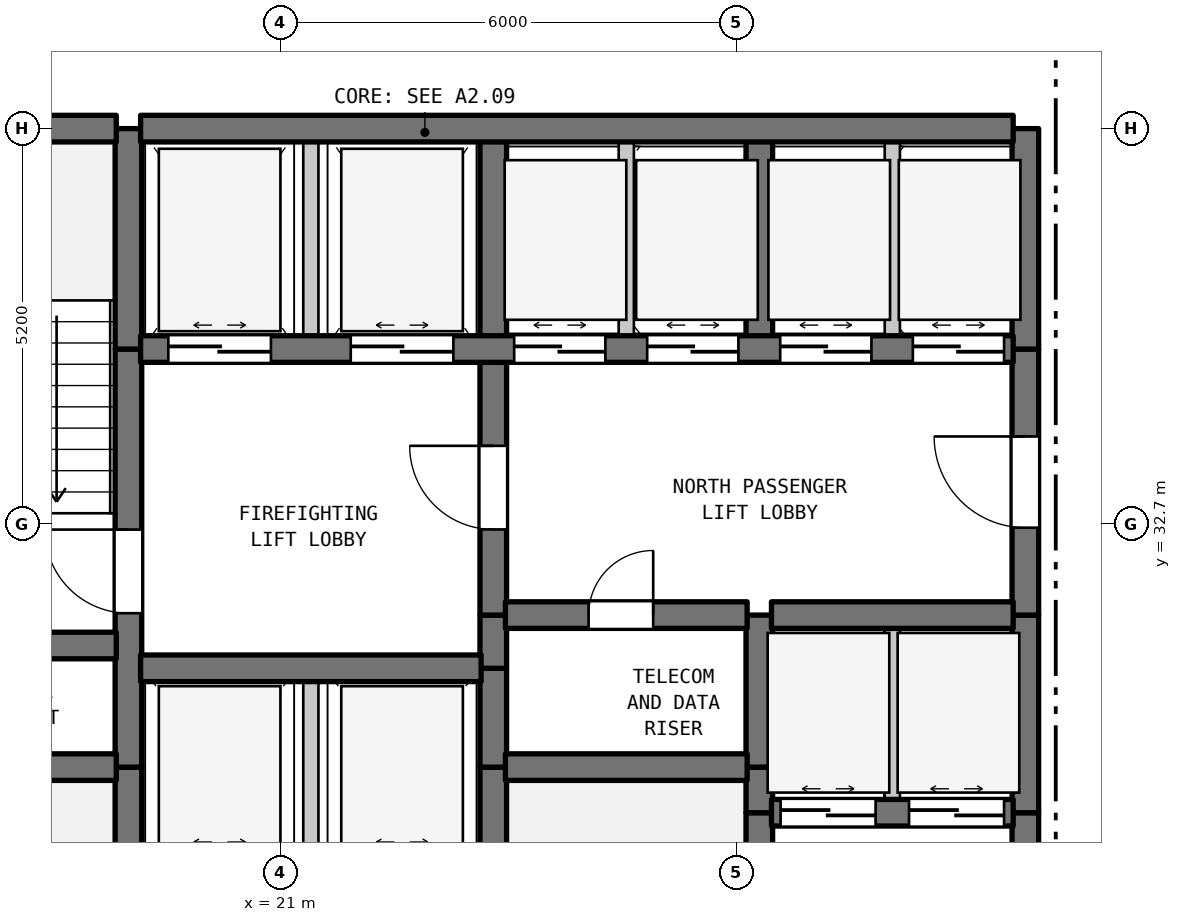
"""IFC4 building model, lengths in metres.
Left out: names, types, materials, properties, quantities, classifications, styles, units other than length and angle.
Written with IfcOpenShell. Run it as: python <this file> out.ifc"""

import sys

from ifc_helpers import new_model, si_unit, direction, frame, frame_2d, origin, place, context, subcontext, project, spatial, rectangle, extrude, element, fill, save


model = new_model("IFC4")
c1 = context("Model", 3, precision=1e-05, world=origin(), true_north=direction((0.0, 1.0)))
c2 = subcontext(c1, "Body", "Model", "MODEL_VIEW")
j1 = project(units=[si_unit("LENGTHUNIT", "METRE"), si_unit("PLANEANGLEUNIT", "RADIAN")], contexts=[c1])
p1 = place(None, origin())
s1 = spatial("IfcSite", under=j1, at=p1, CompositionType="ELEMENT")
p2 = place(p1, origin())
s2 = spatial("IfcBuilding", under=s1, at=p2, CompositionType="ELEMENT")
p3 = place(p2, frame((0.0, 0.0, 105.7)))
s3 = spatial("IfcBuildingStorey", under=s2, at=p3, CompositionType="ELEMENT", Elevation=105.7)
p4 = place(p3, frame((19.0, 28.2, 0.0), z_axis=(0.0, 0.0, 1.0), x_axis=(0.0, 1.0, 0.0)))
e1 = element("IfcWall", 1, at=p4, inside=s3, PredefinedType="SHEAR", context=c2, shape_type="SweptSolid", body=[
    extrude(rectangle(XDim=1.3, YDim=0.35, at=frame_2d((0.65, 0.0))), origin(), (0.0, 0.0, 1.0), 3.385),
])
p5 = place(p3, frame((19.0, 29.5, 0.0), z_axis=(0.0, 0.0, 1.0), x_axis=(0.0, 1.0, 0.0)))
e2 = element("IfcWall", 2, at=p5, inside=s3, PredefinedType="SHEAR", context=c2, shape_type="SweptSolid", body=[
    extrude(rectangle(XDim=5.5, YDim=0.35, at=frame_2d((2.75, 0.0))), origin(), (0.0, 0.0, 1.0), 3.385),
])
p6 = place(p5, frame((2.025, 0.0, 0.0)))
e3 = element("IfcOpeningElement", 3, at=p6, cuts=e2, PredefinedType="OPENING", context=c2, shape_type="SweptSolid", body=[
    extrude(rectangle(XDim=1.1, YDim=2.15, at=frame_2d((0.55, 1.075))), frame((0.0, 0.185, 0.0), z_axis=(0.0, -1.0, 0.0), x_axis=(1.0, 0.0, 0.0)), (0.0, 0.0, 1.0), 0.37),
])
p7 = place(p3, frame((19.0, 35.0, 0.0), z_axis=(0.0, 0.0, 1.0), x_axis=(0.0, 1.0, 0.0)))
e4 = element("IfcWall", 4, at=p7, inside=s3, PredefinedType="SHEAR", context=c2, shape_type="SweptSolid", body=[
    extrude(rectangle(XDim=2.9, YDim=0.35, at=frame_2d((1.45, 0.0))), origin(), (0.0, 0.0, 1.0), 3.385),
])
p8 = place(p3, frame((21.4, 28.2, 0.0), z_axis=(0.0, 0.0, 1.0), x_axis=(0.0, 1.0, 0.0)))
e5 = element("IfcWall", 5, at=p8, inside=s3, PredefinedType="STANDARD", context=c2, shape_type="SweptSolid", body=[
    extrude(rectangle(XDim=2.6, YDim=0.2, at=frame_2d((1.3, 0.0))), origin(), (0.0, 0.0, 1.0), 3.385),
])
p9 = place(p3, frame((21.4, 35.0, 0.0), z_axis=(0.0, 0.0, 1.0), x_axis=(0.0, 1.0, 0.0)))
e6 = element("IfcWall", 6, at=p9, inside=s3, PredefinedType="STANDARD", context=c2, shape_type="SweptSolid", body=[
    extrude(rectangle(XDim=2.9, YDim=0.2, at=frame_2d((1.45, 0.0))), origin(), (0.0, 0.0, 1.0), 3.385),
])
for number, where, z_axis, x_axis in (
    (7, (23.8, 28.2, 0.0), (0.0, 0.0, 1.0), (0.0, 1.0, 0.0)),
    (8, (23.8, 29.5, 0.0), (0.0, 0.0, 1.0), (0.0, 1.0, 0.0)),
):
    element("IfcWall", number, at=place(p3, frame(where, z_axis=z_axis, x_axis=x_axis)), inside=s3, PredefinedType="SHEAR", context=c2, shape_type="SweptSolid", body=[
        extrude(rectangle(XDim=1.3, YDim=0.35, at=frame_2d((0.65, 0.0))), origin(), (0.0, 0.0, 1.0), 3.385),
    ])
p10 = place(p3, frame((23.8, 30.8, 0.0), z_axis=(0.0, 0.0, 1.0), x_axis=(0.0, 1.0, 0.0)))
e9 = element("IfcWall", 9, at=p10, inside=s3, PredefinedType="SHEAR", context=c2, shape_type="SweptSolid", body=[
    extrude(rectangle(XDim=0.7, YDim=0.35, at=frame_2d((0.35, 0.0))), origin(), (0.0, 0.0, 1.0), 3.385),
])
p11 = place(p3, frame((23.8, 31.5, 0.0), z_axis=(0.0, 0.0, 1.0), x_axis=(0.0, 1.0, 0.0)))
e10 = element("IfcWall", 10, at=p11, inside=s3, PredefinedType="SHEAR", context=c2, shape_type="SweptSolid", body=[
    extrude(rectangle(XDim=3.5, YDim=0.35, at=frame_2d((1.75, 0.0))), origin(), (0.0, 0.0, 1.0), 3.385),
])
p12 = place(p11, frame((1.127, 0.0, 0.0)))
e11 = element("IfcOpeningElement", 11, at=p12, cuts=e10, PredefinedType="OPENING", context=c2, shape_type="SweptSolid", body=[
    extrude(rectangle(XDim=1.1, YDim=2.15, at=frame_2d((0.55, 1.075))), frame((0.0, 0.185, 0.0), z_axis=(0.0, -1.0, 0.0), x_axis=(1.0, 0.0, 0.0)), (0.0, 0.0, 1.0), 0.37),
])
p13 = place(p3, frame((23.8, 35.0, 0.0), z_axis=(0.0, 0.0, 1.0), x_axis=(0.0, 1.0, 0.0)))
e12 = element("IfcWall", 12, at=p13, inside=s3, PredefinedType="SHEAR", context=c2, shape_type="SweptSolid", body=[
    extrude(rectangle(XDim=2.9, YDim=0.35, at=frame_2d((1.45, 0.0))), origin(), (0.0, 0.0, 1.0), 3.385),
])
p14 = place(p3, frame((25.55, 35.0, 0.0), z_axis=(0.0, 0.0, 1.0), x_axis=(0.0, 1.0, 0.0)))
e13 = element("IfcWall", 13, at=p14, inside=s3, PredefinedType="STANDARD", context=c2, shape_type="SweptSolid", body=[
    extrude(rectangle(XDim=2.9, YDim=0.2, at=frame_2d((1.45, 0.0))), origin(), (0.0, 0.0, 1.0), 3.385),
])
p15 = place(p3, frame((27.3, 25.6, 0.0), z_axis=(0.0, 0.0, 1.0), x_axis=(0.0, 1.0, 0.0)))
e14 = element("IfcWall", 14, at=p15, inside=s3, PredefinedType="SHEAR", context=c2, shape_type="SweptSolid", body=[
    extrude(rectangle(XDim=3.3, YDim=0.35, at=frame_2d((1.65, 0.0))), origin(), (0.0, 0.0, 1.0), 3.385),
])
p16 = place(p3, frame((27.3, 28.9, 0.0), z_axis=(0.0, 0.0, 1.0), x_axis=(0.0, 1.0, 0.0)))
e15 = element("IfcWall", 15, at=p16, inside=s3, PredefinedType="SHEAR", context=c2, shape_type="SweptSolid", body=[
    extrude(rectangle(XDim=0.6, YDim=0.35, at=frame_2d((0.3, 0.0))), origin(), (0.0, 0.0, 1.0), 3.385),
])
p17 = place(p3, frame((27.3, 29.5, 0.0), z_axis=(0.0, 0.0, 1.0), x_axis=(0.0, 1.0, 0.0)))
e16 = element("IfcWall", 16, at=p17, inside=s3, PredefinedType="SHEAR", context=c2, shape_type="SweptSolid", body=[
    extrude(rectangle(XDim=2.0, YDim=0.35, at=frame_2d((1.0, 0.0))), origin(), (0.0, 0.0, 1.0), 3.385),
])
p18 = place(p3, frame((27.3, 35.0, 0.0), z_axis=(0.0, 0.0, 1.0), x_axis=(0.0, 1.0, 0.0)))
e17 = element("IfcWall", 17, at=p18, inside=s3, PredefinedType="SHEAR", context=c2, shape_type="SweptSolid", body=[
    extrude(rectangle(XDim=2.9, YDim=0.35, at=frame_2d((1.45, 0.0))), origin(), (0.0, 0.0, 1.0), 3.385),
])
p19 = place(p3, frame((29.05, 28.9, 0.0), z_axis=(0.0, 0.0, 1.0), x_axis=(0.0, 1.0, 0.0)))
e18 = element("IfcWall", 18, at=p19, inside=s3, PredefinedType="STANDARD", context=c2, shape_type="SweptSolid", body=[
    extrude(rectangle(XDim=2.6, YDim=0.2, at=frame_2d((1.3, 0.0))), origin(), (0.0, 0.0, 1.0), 3.385),
])
p20 = place(p3, frame((29.05, 35.0, 0.0), z_axis=(0.0, 0.0, 1.0), x_axis=(0.0, 1.0, 0.0)))
e19 = element("IfcWall", 19, at=p20, inside=s3, PredefinedType="STANDARD", context=c2, shape_type="SweptSolid", body=[
    extrude(rectangle(XDim=2.9, YDim=0.2, at=frame_2d((1.45, 0.0))), origin(), (0.0, 0.0, 1.0), 3.385),
])
p21 = place(p3, frame((30.8, 25.6, 0.0), z_axis=(0.0, 0.0, 1.0), x_axis=(0.0, 1.0, 0.0)))
e20 = element("IfcWall", 20, at=p21, inside=s3, PredefinedType="SHEAR", context=c2, shape_type="SweptSolid", body=[
    extrude(rectangle(XDim=3.3, YDim=0.35, at=frame_2d((1.65, 0.0))), origin(), (0.0, 0.0, 1.0), 3.385),
])
p22 = place(p21, frame((0.978, 0.0, 0.0)))
e21 = element("IfcOpeningElement", 21, at=p22, cuts=e20, PredefinedType="OPENING", context=c2, shape_type="SweptSolid", body=[
    extrude(rectangle(XDim=1.2, YDim=2.2, at=frame_2d((0.6, 1.1))), frame((0.0, 0.185, 0.0), z_axis=(0.0, -1.0, 0.0), x_axis=(1.0, 0.0, 0.0)), (0.0, 0.0, 1.0), 0.37),
])
p23 = place(p3, frame((30.8, 28.9, 0.0), z_axis=(0.0, 0.0, 1.0), x_axis=(0.0, 1.0, 0.0)))
e22 = element("IfcWall", 22, at=p23, inside=s3, PredefinedType="SHEAR", context=c2, shape_type="SweptSolid", body=[
    extrude(rectangle(XDim=2.6, YDim=0.35, at=frame_2d((1.3, 0.0))), origin(), (0.0, 0.0, 1.0), 3.385),
])
p24 = place(p3, frame((30.8, 31.5, 0.0), z_axis=(0.0, 0.0, 1.0), x_axis=(0.0, 1.0, 0.0)))
e23 = element("IfcWall", 23, at=p24, inside=s3, PredefinedType="SHEAR", context=c2, shape_type="SweptSolid", body=[
    extrude(rectangle(XDim=3.5, YDim=0.35, at=frame_2d((1.75, 0.0))), origin(), (0.0, 0.0, 1.0), 3.385),
])
p25 = place(p24, frame((1.15, 0.0, 0.0)))
e24 = element("IfcOpeningElement", 24, at=p25, cuts=e23, PredefinedType="OPENING", context=c2, shape_type="SweptSolid", body=[
    extrude(rectangle(XDim=1.2, YDim=2.2, at=frame_2d((0.6, 1.1))), frame((0.0, 0.185, 0.0), z_axis=(0.0, -1.0, 0.0), x_axis=(1.0, 0.0, 0.0)), (0.0, 0.0, 1.0), 0.37),
])
p26 = place(p3, frame((30.8, 35.0, 0.0), z_axis=(0.0, 0.0, 1.0), x_axis=(0.0, 1.0, 0.0)))
e25 = element("IfcWall", 25, at=p26, inside=s3, PredefinedType="SHEAR", context=c2, shape_type="SweptSolid", body=[
    extrude(rectangle(XDim=2.9, YDim=0.35, at=frame_2d((1.45, 0.0))), origin(), (0.0, 0.0, 1.0), 3.385),
])
p27 = place(p3, frame((27.46, 28.9, 0.0), z_axis=(0.0, 0.0, 1.0), x_axis=(1.0, 0.0, 0.0)))
e26 = element("IfcWall", 26, at=p27, inside=s3, PredefinedType="SHEAR", context=c2, shape_type="SweptSolid", body=[
    extrude(rectangle(XDim=3.18, YDim=0.35, at=frame_2d((1.59, 0.0))), origin(), (0.0, 0.0, 1.0), 3.385),
])
p28 = place(p27, frame((0.12, 0.0, 0.0)))
e27 = element("IfcOpeningElement", 27, at=p28, cuts=e26, PredefinedType="OPENING", context=c2, shape_type="SweptSolid", body=[
    extrude(rectangle(XDim=1.25, YDim=2.2, at=frame_2d((0.625, 1.1))), frame((0.0, 0.185, 0.0), z_axis=(0.0, -1.0, 0.0), x_axis=(1.0, 0.0, 0.0)), (0.0, 0.0, 1.0), 0.37),
])
p29 = place(p27, frame((1.81, 0.0, 0.0)))
e28 = element("IfcOpeningElement", 28, at=p29, cuts=e26, PredefinedType="OPENING", context=c2, shape_type="SweptSolid", body=[
    extrude(rectangle(XDim=1.25, YDim=2.2, at=frame_2d((0.625, 1.1))), frame((0.0, 0.185, 0.0), z_axis=(0.0, -1.0, 0.0), x_axis=(1.0, 0.0, 0.0)), (0.0, 0.0, 1.0), 0.37),
])
p30 = place(p3, frame((15.16, 29.5, 0.0), z_axis=(0.0, 0.0, 1.0), x_axis=(1.0, 0.0, 0.0)))
e29 = element("IfcWall", 29, at=p30, inside=s3, PredefinedType="SHEAR", context=c2, shape_type="SweptSolid", body=[
    extrude(rectangle(XDim=3.68, YDim=0.35, at=frame_2d((1.84, 0.0))), origin(), (0.0, 0.0, 1.0), 3.385),
])
p31 = place(p3, frame((23.96, 29.5, 0.0), z_axis=(0.0, 0.0, 1.0), x_axis=(1.0, 0.0, 0.0)))
e30 = element("IfcWall", 30, at=p31, inside=s3, PredefinedType="SHEAR", context=c2, shape_type="SweptSolid", body=[
    extrude(rectangle(XDim=3.18, YDim=0.35, at=frame_2d((1.59, 0.0))), origin(), (0.0, 0.0, 1.0), 3.385),
])
p32 = place(p3, frame((19.16, 30.8, 0.0), z_axis=(0.0, 0.0, 1.0), x_axis=(1.0, 0.0, 0.0)))
e31 = element("IfcWall", 31, at=p32, inside=s3, PredefinedType="SHEAR", context=c2, shape_type="SweptSolid", body=[
    extrude(rectangle(XDim=4.48, YDim=0.35, at=frame_2d((2.24, 0.0))), origin(), (0.0, 0.0, 1.0), 3.385),
])
p33 = place(p3, frame((15.16, 31.1, 0.0), z_axis=(0.0, 0.0, 1.0), x_axis=(1.0, 0.0, 0.0)))
e32 = element("IfcWall", 32, at=p33, inside=s3, PredefinedType="SHEAR", context=c2, shape_type="SweptSolid", body=[
    extrude(rectangle(XDim=3.68, YDim=0.35, at=frame_2d((1.84, 0.0))), origin(), (0.0, 0.0, 1.0), 3.385),
])
p34 = place(p3, frame((23.96, 31.5, 0.0), z_axis=(0.0, 0.0, 1.0), x_axis=(1.0, 0.0, 0.0)))
e33 = element("IfcWall", 33, at=p34, inside=s3, PredefinedType="SHEAR", context=c2, shape_type="SweptSolid", body=[
    extrude(rectangle(XDim=3.18, YDim=0.35, at=frame_2d((1.59, 0.0))), origin(), (0.0, 0.0, 1.0), 3.385),
])
p35 = place(p34, frame((1.094, 0.0, 0.0)))
e34 = element("IfcOpeningElement", 34, at=p35, cuts=e33, PredefinedType="OPENING", context=c2, shape_type="SweptSolid", body=[
    extrude(rectangle(XDim=0.85, YDim=2.1, at=frame_2d((0.425, 1.05))), frame((0.0, 0.185, 0.0), z_axis=(0.0, -1.0, 0.0), x_axis=(1.0, 0.0, 0.0)), (0.0, 0.0, 1.0), 0.37),
])
p36 = place(p3, frame((27.46, 31.5, 0.0), z_axis=(0.0, 0.0, 1.0), x_axis=(1.0, 0.0, 0.0)))
e35 = element("IfcWall", 35, at=p36, inside=s3, PredefinedType="SHEAR", context=c2, shape_type="SweptSolid", body=[
    extrude(rectangle(XDim=3.18, YDim=0.35, at=frame_2d((1.59, 0.0))), origin(), (0.0, 0.0, 1.0), 3.385),
])
p37 = place(p3, frame((19.16, 35.0, 0.0), z_axis=(0.0, 0.0, 1.0), x_axis=(1.0, 0.0, 0.0)))
e36 = element("IfcWall", 36, at=p37, inside=s3, PredefinedType="SHEAR", context=c2, shape_type="SweptSolid", body=[
    extrude(rectangle(XDim=11.48, YDim=0.35, at=frame_2d((5.74, 0.0))), origin(), (0.0, 0.0, 1.0), 3.385),
])
p38 = place(p37, frame((0.365, 0.0, 0.0)))
e37 = element("IfcOpeningElement", 37, at=p38, cuts=e36, PredefinedType="OPENING", context=c2, shape_type="SweptSolid", body=[
    extrude(rectangle(XDim=1.35, YDim=2.2, at=frame_2d((0.675, 1.1))), frame((0.0, 0.185, 0.0), z_axis=(0.0, -1.0, 0.0), x_axis=(1.0, 0.0, 0.0)), (0.0, 0.0, 1.0), 0.37),
])
p39 = place(p37, frame((2.765, 0.0, 0.0)))
e38 = element("IfcOpeningElement", 38, at=p39, cuts=e36, PredefinedType="OPENING", context=c2, shape_type="SweptSolid", body=[
    extrude(rectangle(XDim=1.35, YDim=2.2, at=frame_2d((0.675, 1.1))), frame((0.0, 0.185, 0.0), z_axis=(0.0, -1.0, 0.0), x_axis=(1.0, 0.0, 0.0)), (0.0, 0.0, 1.0), 0.37),
])
p40 = place(p37, frame((4.915, 0.0, 0.0)))
e39 = element("IfcOpeningElement", 39, at=p40, cuts=e36, PredefinedType="OPENING", context=c2, shape_type="SweptSolid", body=[
    extrude(rectangle(XDim=1.2, YDim=2.2, at=frame_2d((0.6, 1.1))), frame((0.0, 0.185, 0.0), z_axis=(0.0, -1.0, 0.0), x_axis=(1.0, 0.0, 0.0)), (0.0, 0.0, 1.0), 0.37),
])
p41 = place(p37, frame((6.665, 0.0, 0.0)))
e40 = element("IfcOpeningElement", 40, at=p41, cuts=e36, PredefinedType="OPENING", context=c2, shape_type="SweptSolid", body=[
    extrude(rectangle(XDim=1.2, YDim=2.2, at=frame_2d((0.6, 1.1))), frame((0.0, 0.185, 0.0), z_axis=(0.0, -1.0, 0.0), x_axis=(1.0, 0.0, 0.0)), (0.0, 0.0, 1.0), 0.37),
])
p42 = place(p37, frame((8.415, 0.0, 0.0)))
e41 = element("IfcOpeningElement", 41, at=p42, cuts=e36, PredefinedType="OPENING", context=c2, shape_type="SweptSolid", body=[
    extrude(rectangle(XDim=1.2, YDim=2.2, at=frame_2d((0.6, 1.1))), frame((0.0, 0.185, 0.0), z_axis=(0.0, -1.0, 0.0), x_axis=(1.0, 0.0, 0.0)), (0.0, 0.0, 1.0), 0.37),
])
p43 = place(p37, frame((10.16, 0.0, 0.0)))
e42 = element("IfcOpeningElement", 42, at=p43, cuts=e36, PredefinedType="OPENING", context=c2, shape_type="SweptSolid", body=[
    extrude(rectangle(XDim=1.2, YDim=2.2, at=frame_2d((0.6, 1.1))), frame((0.0, 0.185, 0.0), z_axis=(0.0, -1.0, 0.0), x_axis=(1.0, 0.0, 0.0)), (0.0, 0.0, 1.0), 0.37),
])
p44 = place(p3, frame((15.16, 37.9, 0.0), z_axis=(0.0, 0.0, 1.0), x_axis=(1.0, 0.0, 0.0)))
e43 = element("IfcWall", 43, at=p44, inside=s3, PredefinedType="SHEAR", context=c2, shape_type="SweptSolid", body=[
    extrude(rectangle(XDim=3.68, YDim=0.35, at=frame_2d((1.84, 0.0))), origin(), (0.0, 0.0, 1.0), 3.385),
])
p45 = place(p3, frame((19.16, 37.9, 0.0), z_axis=(0.0, 0.0, 1.0), x_axis=(1.0, 0.0, 0.0)))
e44 = element("IfcWall", 44, at=p45, inside=s3, PredefinedType="SHEAR", context=c2, shape_type="SweptSolid", body=[
    extrude(rectangle(XDim=11.48, YDim=0.35, at=frame_2d((5.74, 0.0))), origin(), (0.0, 0.0, 1.0), 3.385),
])
p46 = place(p6, origin())
e45 = element("IfcDoor", 45, at=p46, inside=s3, OperationType="SINGLE_SWING_RIGHT", PredefinedType="DOOR", context=c2, shape_type="SweptSolid", body=[
    extrude(rectangle(XDim=1.1, YDim=2.15, at=frame_2d((0.55, 1.075))), frame((0.0, 0.025, 0.0), z_axis=(0.0, -1.0, 0.0), x_axis=(1.0, 0.0, 0.0)), (0.0, 0.0, 1.0), 0.05),
])
fill(e3, e45)
p47 = place(p12, origin())
e46 = element("IfcDoor", 46, at=p47, inside=s3, OperationType="SINGLE_SWING_RIGHT", PredefinedType="DOOR", context=c2, shape_type="SweptSolid", body=[
    extrude(rectangle(XDim=1.1, YDim=2.15, at=frame_2d((0.55, 1.075))), frame((0.0, 0.025, 0.0), z_axis=(0.0, -1.0, 0.0), x_axis=(1.0, 0.0, 0.0)), (0.0, 0.0, 1.0), 0.05),
])
fill(e11, e46)
p48 = place(p25, origin())
e47 = element("IfcDoor", 47, at=p48, inside=s3, OperationType="SINGLE_SWING_RIGHT", PredefinedType="DOOR", context=c2, shape_type="SweptSolid", body=[
    extrude(rectangle(XDim=1.2, YDim=2.2, at=frame_2d((0.6, 1.1))), frame((0.0, 0.025, 0.0), z_axis=(0.0, -1.0, 0.0), x_axis=(1.0, 0.0, 0.0)), (0.0, 0.0, 1.0), 0.05),
])
fill(e24, e47)
p49 = place(p28, origin())
e48 = element("IfcDoor", 48, at=p49, inside=s3, OperationType="DOUBLE_DOOR_SLIDING", PredefinedType="DOOR", context=c2, shape_type="SweptSolid", body=[
    extrude(rectangle(XDim=1.25, YDim=2.2, at=frame_2d((0.625, 1.1))), frame((0.0, 0.025, 0.0), z_axis=(0.0, -1.0, 0.0), x_axis=(1.0, 0.0, 0.0)), (0.0, 0.0, 1.0), 0.05),
])
fill(e27, e48)
p50 = place(p29, origin())
e49 = element("IfcDoor", 49, at=p50, inside=s3, OperationType="DOUBLE_DOOR_SLIDING", PredefinedType="DOOR", context=c2, shape_type="SweptSolid", body=[
    extrude(rectangle(XDim=1.25, YDim=2.2, at=frame_2d((0.625, 1.1))), frame((0.0, 0.025, 0.0), z_axis=(0.0, -1.0, 0.0), x_axis=(1.0, 0.0, 0.0)), (0.0, 0.0, 1.0), 0.05),
])
fill(e28, e49)
p51 = place(p35, origin())
e50 = element("IfcDoor", 50, at=p51, inside=s3, OperationType="SINGLE_SWING_RIGHT", PredefinedType="DOOR", context=c2, shape_type="SweptSolid", body=[
    extrude(rectangle(XDim=0.85, YDim=2.1, at=frame_2d((0.425, 1.05))), frame((0.0, 0.025, 0.0), z_axis=(0.0, -1.0, 0.0), x_axis=(1.0, 0.0, 0.0)), (0.0, 0.0, 1.0), 0.05),
])
fill(e34, e50)
p52 = place(p38, origin())
e51 = element("IfcDoor", 51, at=p52, inside=s3, OperationType="DOUBLE_DOOR_SLIDING", PredefinedType="DOOR", context=c2, shape_type="SweptSolid", body=[
    extrude(rectangle(XDim=1.35, YDim=2.2, at=frame_2d((0.675, 1.1))), frame((0.0, 0.025, 0.0), z_axis=(0.0, -1.0, 0.0), x_axis=(1.0, 0.0, 0.0)), (0.0, 0.0, 1.0), 0.05),
])
fill(e37, e51)
p53 = place(p39, origin())
e52 = element("IfcDoor", 52, at=p53, inside=s3, OperationType="DOUBLE_DOOR_SLIDING", PredefinedType="DOOR", context=c2, shape_type="SweptSolid", body=[
    extrude(rectangle(XDim=1.35, YDim=2.2, at=frame_2d((0.675, 1.1))), frame((0.0, 0.025, 0.0), z_axis=(0.0, -1.0, 0.0), x_axis=(1.0, 0.0, 0.0)), (0.0, 0.0, 1.0), 0.05),
])
fill(e38, e52)
p54 = place(p40, origin())
e53 = element("IfcDoor", 53, at=p54, inside=s3, OperationType="DOUBLE_DOOR_SLIDING", PredefinedType="DOOR", context=c2, shape_type="SweptSolid", body=[
    extrude(rectangle(XDim=1.2, YDim=2.2, at=frame_2d((0.6, 1.1))), frame((0.0, 0.025, 0.0), z_axis=(0.0, -1.0, 0.0), x_axis=(1.0, 0.0, 0.0)), (0.0, 0.0, 1.0), 0.05),
])
fill(e39, e53)
p55 = place(p41, origin())
e54 = element("IfcDoor", 54, at=p55, inside=s3, OperationType="DOUBLE_DOOR_SLIDING", PredefinedType="DOOR", context=c2, shape_type="SweptSolid", body=[
    extrude(rectangle(XDim=1.2, YDim=2.2, at=frame_2d((0.6, 1.1))), frame((0.0, 0.025, 0.0), z_axis=(0.0, -1.0, 0.0), x_axis=(1.0, 0.0, 0.0)), (0.0, 0.0, 1.0), 0.05),
])
fill(e40, e54)
p56 = place(p42, origin())
e55 = element("IfcDoor", 55, at=p56, inside=s3, OperationType="DOUBLE_DOOR_SLIDING", PredefinedType="DOOR", context=c2, shape_type="SweptSolid", body=[
    extrude(rectangle(XDim=1.2, YDim=2.2, at=frame_2d((0.6, 1.1))), frame((0.0, 0.025, 0.0), z_axis=(0.0, -1.0, 0.0), x_axis=(1.0, 0.0, 0.0)), (0.0, 0.0, 1.0), 0.05),
])
fill(e41, e55)
p57 = place(p43, origin())
e56 = element("IfcDoor", 56, at=p57, inside=s3, OperationType="DOUBLE_DOOR_SLIDING", PredefinedType="DOOR", context=c2, shape_type="SweptSolid", body=[
    extrude(rectangle(XDim=1.2, YDim=2.2, at=frame_2d((0.6, 1.1))), frame((0.0, 0.025, 0.0), z_axis=(0.0, -1.0, 0.0), x_axis=(1.0, 0.0, 0.0)), (0.0, 0.0, 1.0), 0.05),
])
fill(e42, e56)
save(model, sys.argv[1])
